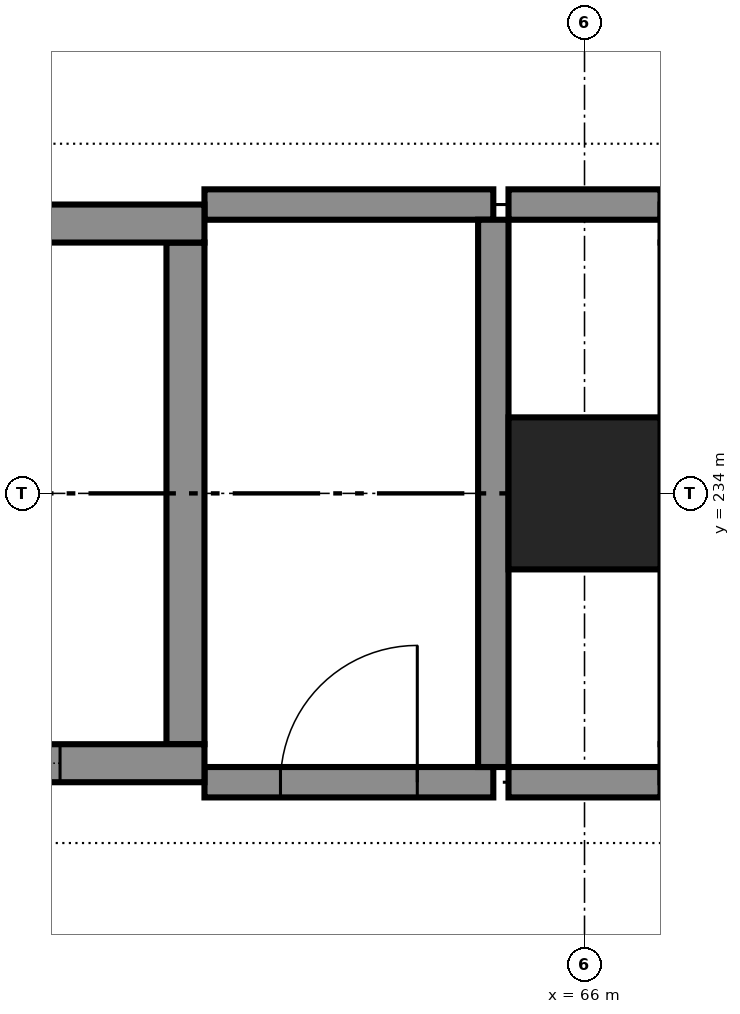
"""IFC4 building model, lengths in metres.
Left out: names, types, materials, properties, quantities, classifications, styles, units other than length and angle.
Written with IfcOpenShell. Run it as: python <this file> out.ifc"""

import sys

from ifc_helpers import new_model, si_unit, direction, frame, frame_2d, origin, origin_2d, place, context, subcontext, project, spatial, rectangle, extrude, element, fill, save


model = new_model("IFC4")
c1 = context("Model", 3, precision=1e-05, world=origin(), true_north=direction((0.0, 1.0)))
c2 = subcontext(c1, "Body", "Model", "MODEL_VIEW")
j1 = project(units=[si_unit("LENGTHUNIT", "METRE"), si_unit("PLANEANGLEUNIT", "RADIAN")], contexts=[c1])
p1 = place(None, origin())
s1 = spatial("IfcSite", under=j1, at=p1, CompositionType="ELEMENT")
p2 = place(p1, origin())
s2 = spatial("IfcBuilding", under=s1, at=p2, CompositionType="ELEMENT")
p3 = place(p2, frame((0.0, 0.0, 12.0)))
s3 = spatial("IfcBuildingStorey", under=s2, at=p3, CompositionType="ELEMENT", Elevation=12.0)
p4 = place(p3, frame((66.0, 234.0, 0.0), z_axis=(0.0, 0.0, 1.0), x_axis=(1.0, 0.0, 0.0)))
e1 = element("IfcColumn", 1, at=p4, inside=s3, PredefinedType="COLUMN", context=c2, shape_type="SweptSolid", body=[
    extrude(rectangle(XDim=1.0, YDim=1.0, at=origin_2d()), origin(), (0.0, 0.0, 1.0), 5.0),
])
p5 = place(p3, frame((60.5, 232.225, 0.0), z_axis=(0.0, 0.0, 1.0), x_axis=(1.0, 0.0, 0.0)))
e2 = element("IfcWall", 2, at=p5, inside=s3, PredefinedType="SHEAR", context=c2, shape_type="SweptSolid", body=[
    extrude(rectangle(XDim=3.0, YDim=0.25, at=frame_2d((1.5, 0.0))), origin(), (0.0, 0.0, 1.0), 5.0),
])
p6 = place(p5, frame((0.95, 0.0, 0.0)))
e3 = element("IfcOpeningElement", 3, at=p6, cuts=e2, PredefinedType="OPENING", context=c2, shape_type="SweptSolid", body=[
    extrude(rectangle(XDim=1.1, YDim=2.1, at=frame_2d((0.55, 1.05))), frame((0.0, 0.135, 0.0), z_axis=(0.0, -1.0, 0.0), x_axis=(1.0, 0.0, 0.0)), (0.0, 0.0, 1.0), 0.27),
])
p7 = place(p3, frame((60.5, 235.775, 0.0), z_axis=(0.0, 0.0, 1.0), x_axis=(1.0, 0.0, 0.0)))
e4 = element("IfcWall", 4, at=p7, inside=s3, PredefinedType="SHEAR", context=c2, shape_type="SweptSolid", body=[
    extrude(rectangle(XDim=3.0, YDim=0.25, at=frame_2d((1.5, 0.0))), origin(), (0.0, 0.0, 1.0), 5.0),
])
p8 = place(p3, frame((63.375, 232.35, 0.0), z_axis=(0.0, 0.0, 1.0), x_axis=(0.0, 1.0, 0.0)))
e5 = element("IfcWall", 5, at=p8, inside=s3, PredefinedType="SHEAR", context=c2, shape_type="SweptSolid", body=[
    extrude(rectangle(XDim=3.3, YDim=0.25, at=frame_2d((1.65, 0.0))), origin(), (0.0, 0.0, 1.0), 5.0),
])
p9 = place(p3, frame((63.5, 232.1, 0.0), z_axis=(0.0, 0.0, 1.0), x_axis=(1.0, 0.0, 0.0)))
e6 = element("IfcWall", 6, at=p9, inside=s3, PredefinedType="PARTITIONING", context=c2, shape_type="SweptSolid", body=[
    extrude(rectangle(XDim=1.9, YDim=0.2, at=frame_2d((0.95, 0.0))), origin(), (0.0, 0.0, 1.0), 4.75),
])
p10 = place(p9, frame((0.5, 0.0, 0.0)))
e7 = element("IfcOpeningElement", 7, at=p10, cuts=e6, PredefinedType="OPENING", context=c2, shape_type="SweptSolid", body=[
    extrude(rectangle(XDim=0.9, YDim=2.1, at=frame_2d((0.45, 1.05))), frame((0.0, 0.11, 0.0), z_axis=(0.0, -1.0, 0.0), x_axis=(1.0, 0.0, 0.0)), (0.0, 0.0, 1.0), 0.22),
])
p11 = place(p3, frame((65.5, 232.1, 0.0), z_axis=(0.0, 0.0, 1.0), x_axis=(1.0, 0.0, 0.0)))
e8 = element("IfcWall", 8, at=p11, inside=s3, PredefinedType="PARTITIONING", context=c2, shape_type="SweptSolid", body=[
    extrude(rectangle(XDim=1.0, YDim=0.2, at=frame_2d((0.5, 0.0))), origin(), (0.0, 0.0, 1.0), 4.75),
])
p12 = place(p3, frame((63.5, 235.9, 0.0), z_axis=(0.0, 0.0, 1.0), x_axis=(1.0, 0.0, 0.0)))
e9 = element("IfcWall", 9, at=p12, inside=s3, PredefinedType="PARTITIONING", context=c2, shape_type="SweptSolid", body=[
    extrude(rectangle(XDim=1.9, YDim=0.2, at=frame_2d((0.95, 0.0))), origin(), (0.0, 0.0, 1.0), 4.75),
])
p13 = place(p3, frame((65.5, 235.9, 0.0), z_axis=(0.0, 0.0, 1.0), x_axis=(1.0, 0.0, 0.0)))
e10 = element("IfcWall", 10, at=p13, inside=s3, PredefinedType="PARTITIONING", context=c2, shape_type="SweptSolid", body=[
    extrude(rectangle(XDim=1.0, YDim=0.2, at=frame_2d((0.5, 0.0))), origin(), (0.0, 0.0, 1.0), 4.75),
])
p14 = place(p3, frame((65.4, 232.2, 0.0), z_axis=(0.0, 0.0, 1.0), x_axis=(0.0, 1.0, 0.0)))
e11 = element("IfcWall", 11, at=p14, inside=s3, PredefinedType="PARTITIONING", context=c2, shape_type="SweptSolid", body=[
    extrude(rectangle(XDim=3.6, YDim=0.2, at=frame_2d((1.8, 0.0))), origin(), (0.0, 0.0, 1.0), 4.75),
])
p15 = place(p10, origin())
e12 = element("IfcDoor", 12, at=p15, inside=s3, OperationType="SINGLE_SWING_RIGHT", PredefinedType="DOOR", context=c2, shape_type="SweptSolid", body=[
    extrude(rectangle(XDim=0.9, YDim=2.1, at=frame_2d((0.45, 1.05))), frame((0.0, 0.025, 0.0), z_axis=(0.0, -1.0, 0.0), x_axis=(1.0, 0.0, 0.0)), (0.0, 0.0, 1.0), 0.05),
])
fill(e7, e12)
p16 = place(p6, origin())
e13 = element("IfcDoor", 13, at=p16, inside=s3, OperationType="SLIDING_TO_LEFT", PredefinedType="DOOR", context=c2, shape_type="SweptSolid", body=[
    extrude(rectangle(XDim=1.1, YDim=2.1, at=frame_2d((0.55, 1.05))), frame((0.0, 0.025, 0.0), z_axis=(0.0, -1.0, 0.0), x_axis=(1.0, 0.0, 0.0)), (0.0, 0.0, 1.0), 0.05),
])
fill(e3, e13)
save(model, sys.argv[1])
